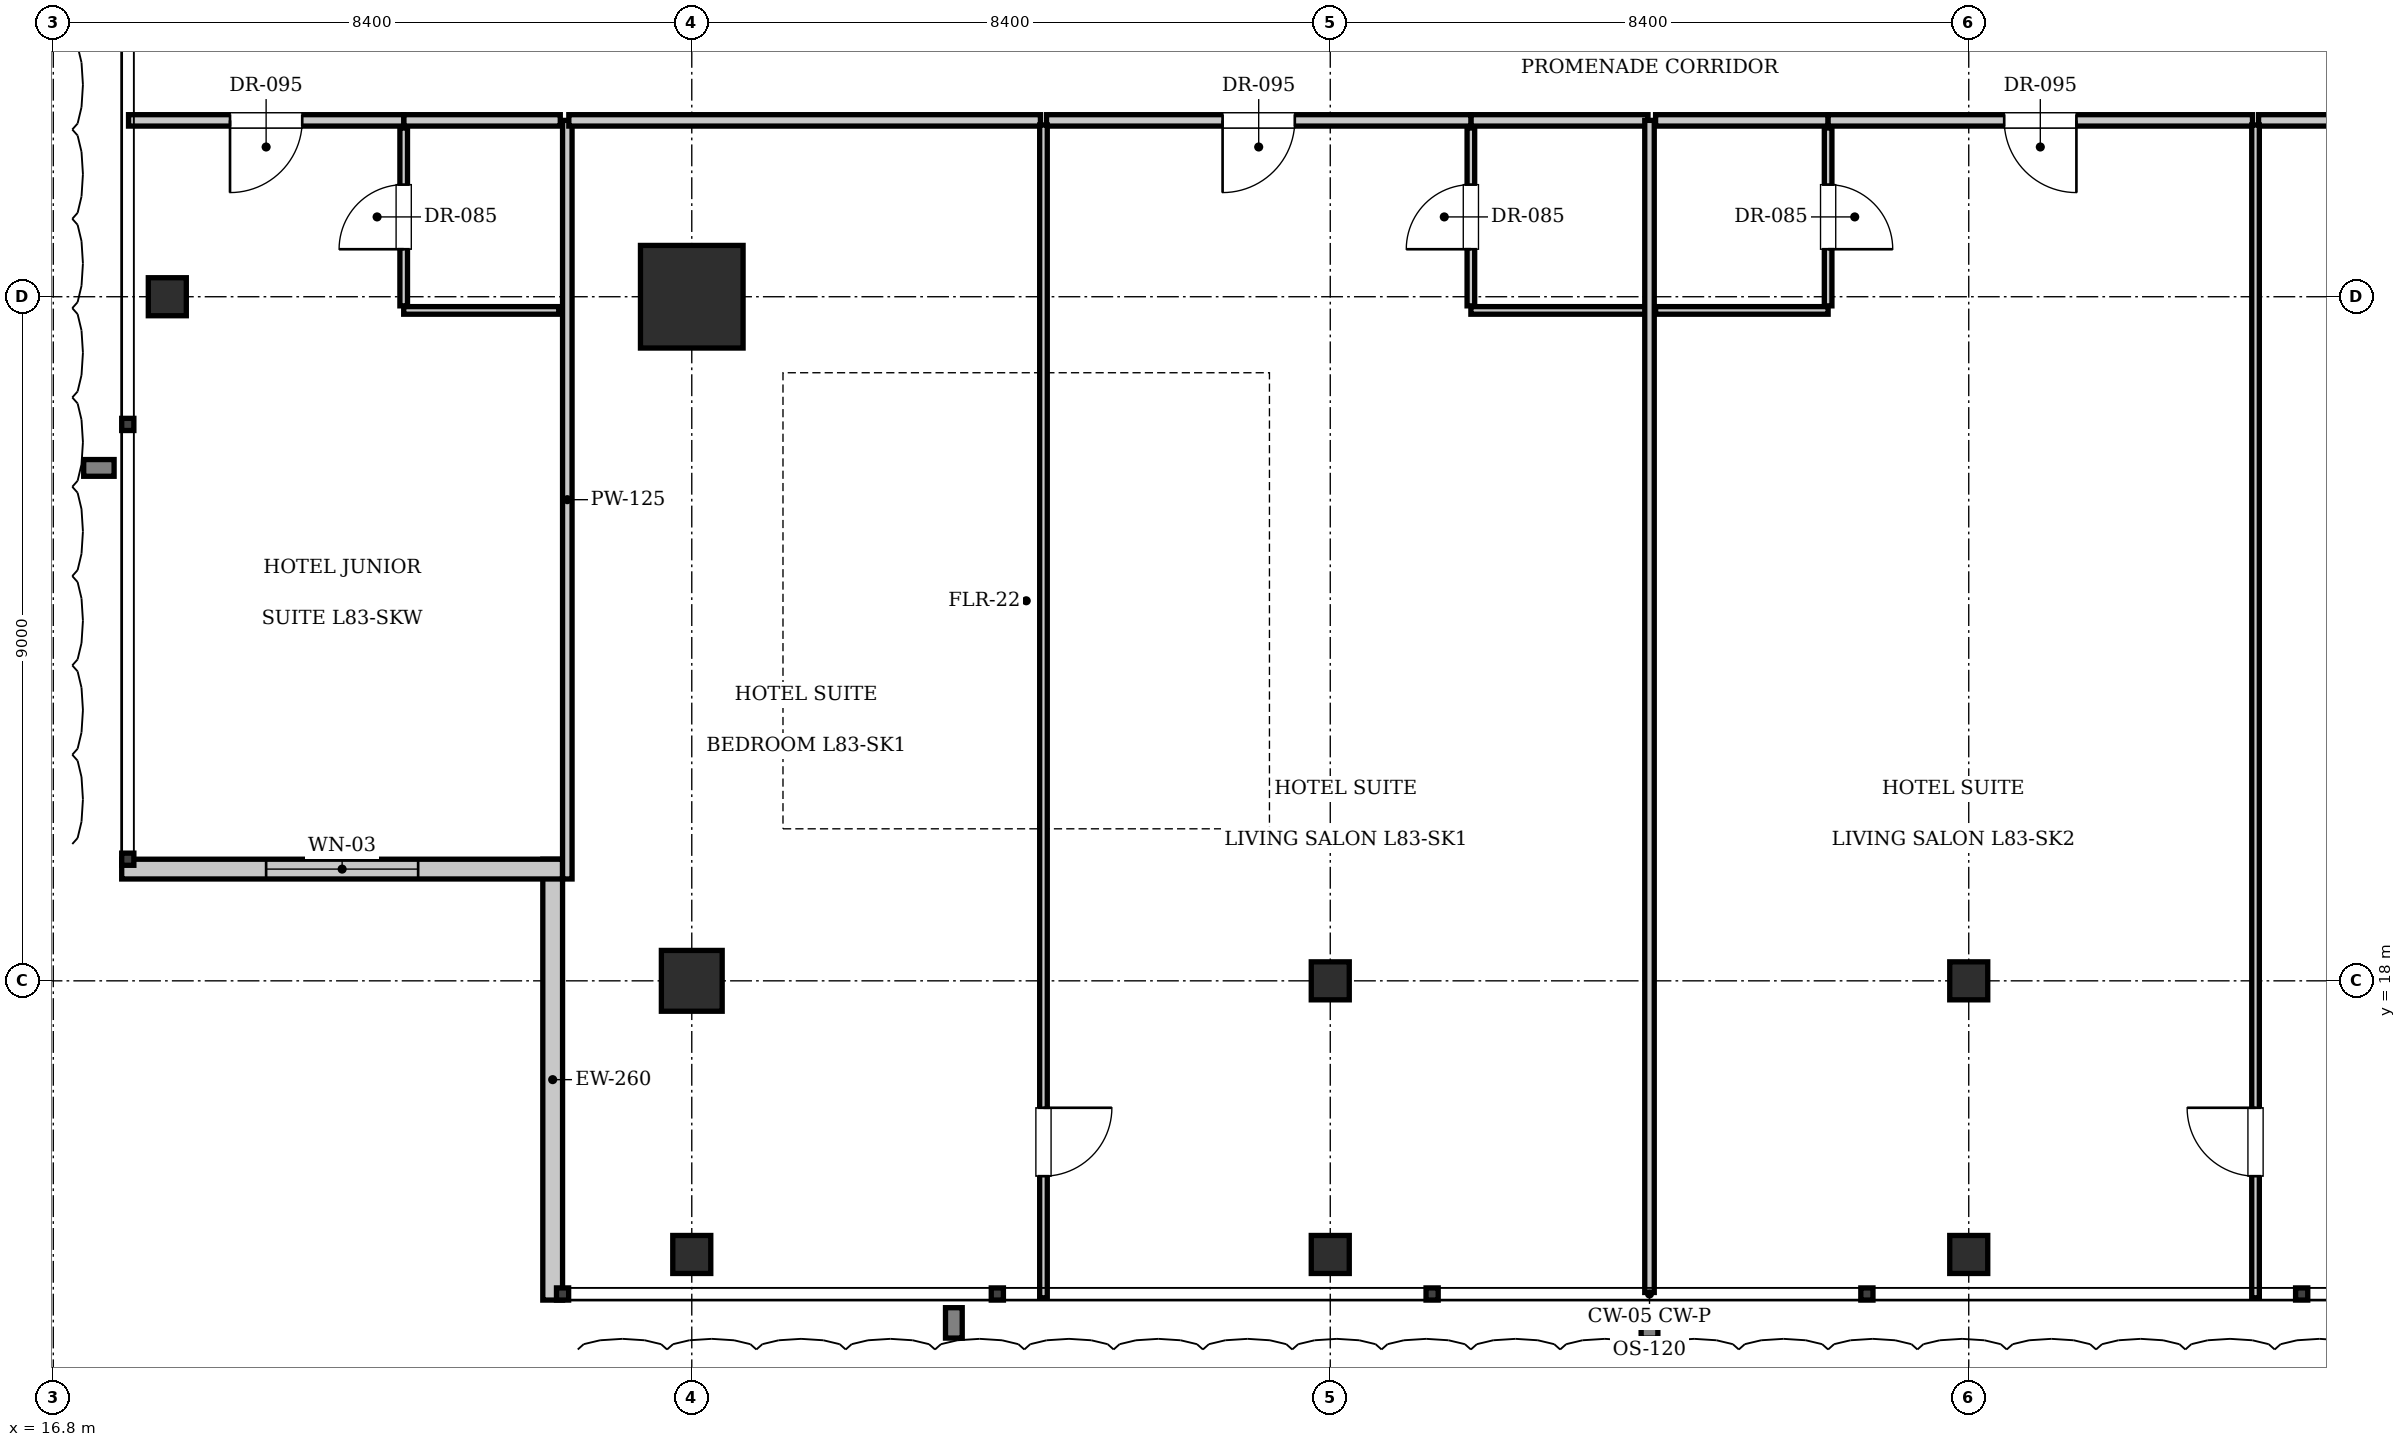
"""IFC4 building model, lengths in metres.
Left out: names, types, materials, properties, quantities, classifications, styles, units other than length and angle.
Written with IfcOpenShell. Run it as: python <this file> out.ifc"""

import sys

from ifc_helpers import new_model, si_unit, direction, frame, frame_2d, origin, origin_2d, place, context, subcontext, project, spatial, rectangle, i_section, extrude, element, fill, save


model = new_model("IFC4")
c1 = context("Model", 3, precision=1e-05, world=origin(), true_north=direction((0.0, 1.0)))
c2 = subcontext(c1, "Body", "Model", "MODEL_VIEW")
j1 = project(units=[si_unit("LENGTHUNIT", "METRE"), si_unit("PLANEANGLEUNIT", "RADIAN")], contexts=[c1])
p1 = place(None, origin())
s1 = spatial("IfcSite", under=j1, at=p1, CompositionType="ELEMENT")
p2 = place(p1, origin())
s2 = spatial("IfcBuilding", under=s1, at=p2, CompositionType="ELEMENT")
p3 = place(p2, frame((0.0, 0.0, 337.4)))
s3 = spatial("IfcBuildingStorey", under=s2, at=p3, CompositionType="ELEMENT", Elevation=337.4)
p4 = place(p3, frame((25.2, 27.0, 0.0), z_axis=(0.0, 0.0, 1.0), x_axis=(1.0, 0.0, 0.0)))
e1 = element("IfcColumn", 1, at=p4, inside=s3, PredefinedType="COLUMN", context=c2, shape_type="SweptSolid", body=[
    extrude(rectangle(XDim=1.35, YDim=1.35, at=origin_2d()), origin(), (0.0, 0.0, 1.0), 3.85),
])
p5 = place(p3, frame((25.2, 18.0, 0.0), z_axis=(0.0, 0.0, 1.0), x_axis=(1.0, 0.0, 0.0)))
e2 = element("IfcColumn", 2, at=p5, inside=s3, PredefinedType="COLUMN", context=c2, shape_type="SweptSolid", body=[
    extrude(rectangle(XDim=0.8, YDim=0.8, at=origin_2d()), origin(), (0.0, 0.0, 1.0), 3.85),
])
for number, where, z_axis, x_axis in (
    (3, (33.6, 18.0, 0.0), (0.0, 0.0, 1.0), (1.0, 0.0, 0.0)),
    (4, (42.0, 18.0, 0.0), (0.0, 0.0, 1.0), (1.0, 0.0, 0.0)),
    (5, (18.3, 27.0, 0.0), (0.0, 0.0, 1.0), (1.0, 0.0, 0.0)),
    (6, (25.2, 14.4, 0.0), (0.0, 0.0, 1.0), (1.0, 0.0, 0.0)),
    (7, (33.6, 14.4, 0.0), (0.0, 0.0, 1.0), (1.0, 0.0, 0.0)),
    (8, (42.0, 14.4, 0.0), (0.0, 0.0, 1.0), (1.0, 0.0, 0.0)),
):
    element("IfcColumn", number, at=place(p3, frame(where, z_axis=z_axis, x_axis=x_axis)), inside=s3, PredefinedType="COLUMN", context=c2, shape_type="SweptSolid", body=[
        extrude(i_section(OverallWidth=0.5, OverallDepth=0.5, WebThickness=0.022, FlangeThickness=0.032, at=origin_2d()), origin(), (0.0, 0.0, 1.0), 3.85),
    ])
p6 = place(p3, frame((23.37, 13.8, 0.0), z_axis=(0.0, 0.0, 1.0), x_axis=(0.0, 1.0, 0.0)))
e9 = element("IfcWall", 9, at=p6, inside=s3, PredefinedType="SOLIDWALL", context=c2, shape_type="SweptSolid", body=[
    extrude(rectangle(XDim=5.8, YDim=0.26, at=frame_2d((2.9, 0.0))), origin(), (0.0, 0.0, 1.0), 3.61),
])
p7 = place(p3, frame((23.5, 19.47, 0.0), z_axis=(0.0, 0.0, 1.0), x_axis=(-1.0, 0.0, 0.0)))
e10 = element("IfcWall", 10, at=p7, inside=s3, PredefinedType="SOLIDWALL", context=c2, shape_type="SweptSolid", body=[
    extrude(rectangle(XDim=5.8, YDim=0.26, at=frame_2d((2.9, 0.0))), origin(), (0.0, 0.0, 1.0), 3.61),
])
p8 = place(p7, frame((1.9, 0.0, 0.9)))
e11 = element("IfcOpeningElement", 11, at=p8, cuts=e10, PredefinedType="OPENING", context=c2, shape_type="SweptSolid", body=[
    extrude(rectangle(XDim=2.0, YDim=2.2, at=frame_2d((1.0, 1.1))), frame((0.0, 0.14, 0.0), z_axis=(0.0, -1.0, 0.0), x_axis=(1.0, 0.0, 0.0)), (0.0, 0.0, 1.0), 0.28),
])
p9 = place(p3, frame((23.562, 19.34, 0.0), z_axis=(0.0, 0.0, 1.0), x_axis=(0.0, 1.0, 0.0)))
e12 = element("IfcWall", 12, at=p9, inside=s3, PredefinedType="PARTITIONING", context=c2, shape_type="SweptSolid", body=[
    extrude(rectangle(XDim=9.98, YDim=0.125, at=frame_2d((4.99, 0.0))), origin(), (0.0, 0.0, 1.0), 3.61),
])
p10 = place(p3, frame((35.45, 29.32, 0.0), z_axis=(0.0, 0.0, 1.0), x_axis=(1.0, 0.0, 0.0)))
e13 = element("IfcWall", 13, at=p10, inside=s3, PredefinedType="PARTITIONING", context=c2, shape_type="SweptSolid", body=[
    extrude(rectangle(XDim=2.33, YDim=0.15, at=frame_2d((1.165, 0.0))), origin(), (0.0, 0.0, 1.0), 3.61),
])
p11 = place(p3, frame((35.45, 26.82, 0.0), z_axis=(0.0, 0.0, 1.0), x_axis=(1.0, 0.0, 0.0)))
e14 = element("IfcWall", 14, at=p11, inside=s3, PredefinedType="PARTITIONING", context=c2, shape_type="SweptSolid", body=[
    extrude(rectangle(XDim=2.31, YDim=0.1, at=frame_2d((1.155, 0.0))), origin(), (0.0, 0.0, 1.0), 2.41),
])
p12 = place(p3, frame((35.45, 26.88, 0.0), z_axis=(0.0, 0.0, 1.0), x_axis=(0.0, 1.0, 0.0)))
e15 = element("IfcWall", 15, at=p12, inside=s3, PredefinedType="PARTITIONING", context=c2, shape_type="SweptSolid", body=[
    extrude(rectangle(XDim=2.34, YDim=0.1, at=frame_2d((1.17, 0.0))), origin(), (0.0, 0.0, 1.0), 3.61),
])
p13 = place(p12, frame((0.745, 0.0, 0.0)))
e16 = element("IfcOpeningElement", 16, at=p13, cuts=e15, PredefinedType="OPENING", context=c2, shape_type="SweptSolid", body=[
    extrude(rectangle(XDim=0.85, YDim=2.1, at=frame_2d((0.425, 1.05))), frame((0.0, 0.06, 0.0), z_axis=(0.0, -1.0, 0.0), x_axis=(1.0, 0.0, 0.0)), (0.0, 0.0, 1.0), 0.12),
])
p14 = place(p3, frame((23.583, 29.32, 0.0), z_axis=(0.0, 0.0, 1.0), x_axis=(1.0, 0.0, 0.0)))
e17 = element("IfcWall", 17, at=p14, inside=s3, PredefinedType="PARTITIONING", context=c2, shape_type="SweptSolid", body=[
    extrude(rectangle(XDim=6.205, YDim=0.15, at=frame_2d((3.102, 0.0))), origin(), (0.0, 0.0, 1.0), 3.61),
])
p15 = place(p3, frame((29.867, 29.32, 0.0), z_axis=(0.0, 0.0, 1.0), x_axis=(1.0, 0.0, 0.0)))
e18 = element("IfcWall", 18, at=p15, inside=s3, PredefinedType="PARTITIONING", context=c2, shape_type="SweptSolid", body=[
    extrude(rectangle(XDim=5.583, YDim=0.15, at=frame_2d((2.792, 0.0))), origin(), (0.0, 0.0, 1.0), 3.61),
])
p16 = place(p15, frame((2.316, 0.0, 0.0)))
e19 = element("IfcOpeningElement", 19, at=p16, cuts=e18, PredefinedType="OPENING", context=c2, shape_type="SweptSolid", body=[
    extrude(rectangle(XDim=0.95, YDim=2.15, at=frame_2d((0.475, 1.075))), frame((0.0, 0.085, 0.0), z_axis=(0.0, -1.0, 0.0), x_axis=(1.0, 0.0, 0.0)), (0.0, 0.0, 1.0), 0.17),
])
p17 = place(p3, frame((29.827, 13.83, 0.0), z_axis=(0.0, 0.0, 1.0), x_axis=(0.0, 1.0, 0.0)))
e20 = element("IfcWall", 20, at=p17, inside=s3, PredefinedType="PARTITIONING", context=c2, shape_type="SweptSolid", body=[
    extrude(rectangle(XDim=15.43, YDim=0.1, at=frame_2d((7.715, 0.0))), origin(), (0.0, 0.0, 1.0), 3.61),
])
p18 = place(p17, frame((1.6, 0.0, 0.0)))
e21 = element("IfcOpeningElement", 21, at=p18, cuts=e20, PredefinedType="OPENING", context=c2, shape_type="SweptSolid", body=[
    extrude(rectangle(XDim=0.9, YDim=2.1, at=frame_2d((0.45, 1.05))), frame((0.0, 0.06, 0.0), z_axis=(0.0, -1.0, 0.0), x_axis=(1.0, 0.0, 0.0)), (0.0, 0.0, 1.0), 0.12),
])
p19 = place(p3, frame((37.8, 13.9, 0.0), z_axis=(0.0, 0.0, 1.0), x_axis=(0.0, 1.0, 0.0)))
e22 = element("IfcWall", 22, at=p19, inside=s3, PredefinedType="PARTITIONING", context=c2, shape_type="SweptSolid", body=[
    extrude(rectangle(XDim=15.42, YDim=0.125, at=frame_2d((7.71, 0.0))), origin(), (0.0, 0.0, 1.0), 3.403),
])
p20 = place(p3, frame((37.88, 29.32, 0.0), z_axis=(0.0, 0.0, 1.0), x_axis=(1.0, 0.0, 0.0)))
e23 = element("IfcWall", 23, at=p20, inside=s3, PredefinedType="PARTITIONING", context=c2, shape_type="SweptSolid", body=[
    extrude(rectangle(XDim=2.27, YDim=0.15, at=frame_2d((1.135, 0.0))), origin(), (0.0, 0.0, 1.0), 3.61),
])
p21 = place(p3, frame((37.88, 26.82, 0.0), z_axis=(0.0, 0.0, 1.0), x_axis=(1.0, 0.0, 0.0)))
e24 = element("IfcWall", 24, at=p21, inside=s3, PredefinedType="PARTITIONING", context=c2, shape_type="SweptSolid", body=[
    extrude(rectangle(XDim=2.27, YDim=0.1, at=frame_2d((1.135, 0.0))), origin(), (0.0, 0.0, 1.0), 2.41),
])
p22 = place(p3, frame((40.15, 26.88, 0.0), z_axis=(0.0, 0.0, 1.0), x_axis=(0.0, 1.0, 0.0)))
e25 = element("IfcWall", 25, at=p22, inside=s3, PredefinedType="PARTITIONING", context=c2, shape_type="SweptSolid", body=[
    extrude(rectangle(XDim=2.34, YDim=0.1, at=frame_2d((1.17, 0.0))), origin(), (0.0, 0.0, 1.0), 3.61),
])
p23 = place(p22, frame((0.745, 0.0, 0.0)))
e26 = element("IfcOpeningElement", 26, at=p23, cuts=e25, PredefinedType="OPENING", context=c2, shape_type="SweptSolid", body=[
    extrude(rectangle(XDim=0.85, YDim=2.1, at=frame_2d((0.425, 1.05))), frame((0.0, 0.06, 0.0), z_axis=(0.0, -1.0, 0.0), x_axis=(1.0, 0.0, 0.0)), (0.0, 0.0, 1.0), 0.12),
])
p24 = place(p3, frame((40.15, 29.32, 0.0), z_axis=(0.0, 0.0, 1.0), x_axis=(1.0, 0.0, 0.0)))
e27 = element("IfcWall", 27, at=p24, inside=s3, PredefinedType="PARTITIONING", context=c2, shape_type="SweptSolid", body=[
    extrude(rectangle(XDim=5.583, YDim=0.15, at=frame_2d((2.792, 0.0))), origin(), (0.0, 0.0, 1.0), 3.61),
])
p25 = place(p24, frame((2.316, 0.0, 0.0)))
e28 = element("IfcOpeningElement", 28, at=p25, cuts=e27, PredefinedType="OPENING", context=c2, shape_type="SweptSolid", body=[
    extrude(rectangle(XDim=0.95, YDim=2.15, at=frame_2d((0.475, 1.075))), frame((0.0, 0.085, 0.0), z_axis=(0.0, -1.0, 0.0), x_axis=(1.0, 0.0, 0.0)), (0.0, 0.0, 1.0), 0.17),
])
p26 = place(p3, frame((45.813, 29.32, 0.0), z_axis=(0.0, 0.0, 1.0), x_axis=(1.0, 0.0, 0.0)))
e29 = element("IfcWall", 29, at=p26, inside=s3, PredefinedType="PARTITIONING", context=c2, shape_type="SweptSolid", body=[
    extrude(rectangle(XDim=6.205, YDim=0.15, at=frame_2d((3.102, 0.0))), origin(), (0.0, 0.0, 1.0), 3.61),
])
p27 = place(p3, frame((45.773, 13.83, 0.0), z_axis=(0.0, 0.0, 1.0), x_axis=(0.0, 1.0, 0.0)))
e30 = element("IfcWall", 30, at=p27, inside=s3, PredefinedType="PARTITIONING", context=c2, shape_type="SweptSolid", body=[
    extrude(rectangle(XDim=15.43, YDim=0.1, at=frame_2d((7.715, 0.0))), origin(), (0.0, 0.0, 1.0), 3.61),
])
p28 = place(p27, frame((1.6, 0.0, 0.0)))
e31 = element("IfcOpeningElement", 31, at=p28, cuts=e30, PredefinedType="OPENING", context=c2, shape_type="SweptSolid", body=[
    extrude(rectangle(XDim=0.9, YDim=2.1, at=frame_2d((0.45, 1.05))), frame((0.0, 0.06, 0.0), z_axis=(0.0, -1.0, 0.0), x_axis=(1.0, 0.0, 0.0)), (0.0, 0.0, 1.0), 0.12),
])
p29 = place(p3, frame((21.41, 29.32, 0.0), z_axis=(0.0, 0.0, 1.0), x_axis=(1.0, 0.0, 0.0)))
e32 = element("IfcWall", 32, at=p29, inside=s3, PredefinedType="PARTITIONING", context=c2, shape_type="SweptSolid", body=[
    extrude(rectangle(XDim=2.06, YDim=0.15, at=frame_2d((1.03, 0.0))), origin(), (0.0, 0.0, 1.0), 3.61),
])
p30 = place(p3, frame((21.41, 26.82, 0.0), z_axis=(0.0, 0.0, 1.0), x_axis=(1.0, 0.0, 0.0)))
e33 = element("IfcWall", 33, at=p30, inside=s3, PredefinedType="PARTITIONING", context=c2, shape_type="SweptSolid", body=[
    extrude(rectangle(XDim=2.04, YDim=0.1, at=frame_2d((1.02, 0.0))), origin(), (0.0, 0.0, 1.0), 3.61),
])
p31 = place(p3, frame((21.41, 26.88, 0.0), z_axis=(0.0, 0.0, 1.0), x_axis=(0.0, 1.0, 0.0)))
e34 = element("IfcWall", 34, at=p31, inside=s3, PredefinedType="PARTITIONING", context=c2, shape_type="SweptSolid", body=[
    extrude(rectangle(XDim=2.34, YDim=0.1, at=frame_2d((1.17, 0.0))), origin(), (0.0, 0.0, 1.0), 3.61),
])
p32 = place(p31, frame((0.745, 0.0, 0.0)))
e35 = element("IfcOpeningElement", 35, at=p32, cuts=e34, PredefinedType="OPENING", context=c2, shape_type="SweptSolid", body=[
    extrude(rectangle(XDim=0.85, YDim=2.1, at=frame_2d((0.425, 1.05))), frame((0.0, 0.06, 0.0), z_axis=(0.0, -1.0, 0.0), x_axis=(1.0, 0.0, 0.0)), (0.0, 0.0, 1.0), 0.12),
])
p33 = place(p3, frame((17.79, 29.32, 0.0), z_axis=(0.0, 0.0, 1.0), x_axis=(1.0, 0.0, 0.0)))
e36 = element("IfcWall", 36, at=p33, inside=s3, PredefinedType="PARTITIONING", context=c2, shape_type="SweptSolid", body=[
    extrude(rectangle(XDim=3.62, YDim=0.15, at=frame_2d((1.81, 0.0))), origin(), (0.0, 0.0, 1.0), 3.61),
])
p34 = place(p33, frame((1.335, 0.0, 0.0)))
e37 = element("IfcOpeningElement", 37, at=p34, cuts=e36, PredefinedType="OPENING", context=c2, shape_type="SweptSolid", body=[
    extrude(rectangle(XDim=0.95, YDim=2.15, at=frame_2d((0.475, 1.075))), frame((0.0, 0.085, 0.0), z_axis=(0.0, -1.0, 0.0), x_axis=(1.0, 0.0, 0.0)), (0.0, 0.0, 1.0), 0.17),
])
p35 = place(p8, origin())
e38 = element("IfcWindow", 38, at=p35, inside=s3, PartitioningType="SINGLE_PANEL", PredefinedType="WINDOW", context=c2, shape_type="SweptSolid", body=[
    extrude(rectangle(XDim=2.0, YDim=2.2, at=frame_2d((1.0, 1.1))), frame((0.0, 0.03, 0.0), z_axis=(0.0, -1.0, 0.0), x_axis=(1.0, 0.0, 0.0)), (0.0, 0.0, 1.0), 0.06),
])
fill(e11, e38)
p36 = place(p13, origin())
e39 = element("IfcDoor", 39, at=p36, inside=s3, OperationType="SINGLE_SWING_LEFT", PredefinedType="DOOR", context=c2, shape_type="SweptSolid", body=[
    extrude(rectangle(XDim=0.85, YDim=2.1, at=frame_2d((0.425, 1.05))), frame((0.0, 0.025, 0.0), z_axis=(0.0, -1.0, 0.0), x_axis=(1.0, 0.0, 0.0)), (0.0, 0.0, 1.0), 0.05),
])
fill(e16, e39)
p37 = place(p16, frame((0.95, 0.0, 0.0), z_axis=(0.0, 0.0, 1.0), x_axis=(-1.0, 0.0, 0.0)))
e40 = element("IfcDoor", 40, at=p37, inside=s3, OperationType="SINGLE_SWING_RIGHT", PredefinedType="DOOR", context=c2, shape_type="SweptSolid", body=[
    extrude(rectangle(XDim=0.95, YDim=2.15, at=frame_2d((0.475, 1.075))), frame((0.0, 0.025, 0.0), z_axis=(0.0, -1.0, 0.0), x_axis=(1.0, 0.0, 0.0)), (0.0, 0.0, 1.0), 0.05),
])
fill(e19, e40)
p38 = place(p18, frame((0.9, 0.0, 0.0), z_axis=(0.0, 0.0, 1.0), x_axis=(-1.0, 0.0, 0.0)))
e41 = element("IfcDoor", 41, at=p38, inside=s3, OperationType="SINGLE_SWING_LEFT", PredefinedType="DOOR", context=c2, shape_type="SweptSolid", body=[
    extrude(rectangle(XDim=0.9, YDim=2.1, at=frame_2d((0.45, 1.05))), frame((0.0, 0.025, 0.0), z_axis=(0.0, -1.0, 0.0), x_axis=(1.0, 0.0, 0.0)), (0.0, 0.0, 1.0), 0.05),
])
fill(e21, e41)
p39 = place(p23, frame((0.85, 0.0, 0.0), z_axis=(0.0, 0.0, 1.0), x_axis=(-1.0, 0.0, 0.0)))
e42 = element("IfcDoor", 42, at=p39, inside=s3, OperationType="SINGLE_SWING_RIGHT", PredefinedType="DOOR", context=c2, shape_type="SweptSolid", body=[
    extrude(rectangle(XDim=0.85, YDim=2.1, at=frame_2d((0.425, 1.05))), frame((0.0, 0.025, 0.0), z_axis=(0.0, -1.0, 0.0), x_axis=(1.0, 0.0, 0.0)), (0.0, 0.0, 1.0), 0.05),
])
fill(e26, e42)
p40 = place(p25, frame((0.95, 0.0, 0.0), z_axis=(0.0, 0.0, 1.0), x_axis=(-1.0, 0.0, 0.0)))
e43 = element("IfcDoor", 43, at=p40, inside=s3, OperationType="SINGLE_SWING_LEFT", PredefinedType="DOOR", context=c2, shape_type="SweptSolid", body=[
    extrude(rectangle(XDim=0.95, YDim=2.15, at=frame_2d((0.475, 1.075))), frame((0.0, 0.025, 0.0), z_axis=(0.0, -1.0, 0.0), x_axis=(1.0, 0.0, 0.0)), (0.0, 0.0, 1.0), 0.05),
])
fill(e28, e43)
p41 = place(p28, origin())
e44 = element("IfcDoor", 44, at=p41, inside=s3, OperationType="SINGLE_SWING_RIGHT", PredefinedType="DOOR", context=c2, shape_type="SweptSolid", body=[
    extrude(rectangle(XDim=0.9, YDim=2.1, at=frame_2d((0.45, 1.05))), frame((0.0, 0.025, 0.0), z_axis=(0.0, -1.0, 0.0), x_axis=(1.0, 0.0, 0.0)), (0.0, 0.0, 1.0), 0.05),
])
fill(e31, e44)
p42 = place(p32, origin())
e45 = element("IfcDoor", 45, at=p42, inside=s3, OperationType="SINGLE_SWING_LEFT", PredefinedType="DOOR", context=c2, shape_type="SweptSolid", body=[
    extrude(rectangle(XDim=0.85, YDim=2.1, at=frame_2d((0.425, 1.05))), frame((0.0, 0.025, 0.0), z_axis=(0.0, -1.0, 0.0), x_axis=(1.0, 0.0, 0.0)), (0.0, 0.0, 1.0), 0.05),
])
fill(e35, e45)
p43 = place(p34, frame((0.95, 0.0, 0.0), z_axis=(0.0, 0.0, 1.0), x_axis=(-1.0, 0.0, 0.0)))
e46 = element("IfcDoor", 46, at=p43, inside=s3, OperationType="SINGLE_SWING_RIGHT", PredefinedType="DOOR", context=c2, shape_type="SweptSolid", body=[
    extrude(rectangle(XDim=0.95, YDim=2.15, at=frame_2d((0.475, 1.075))), frame((0.0, 0.025, 0.0), z_axis=(0.0, -1.0, 0.0), x_axis=(1.0, 0.0, 0.0)), (0.0, 0.0, 1.0), 0.05),
])
fill(e37, e46)
save(model, sys.argv[1])
